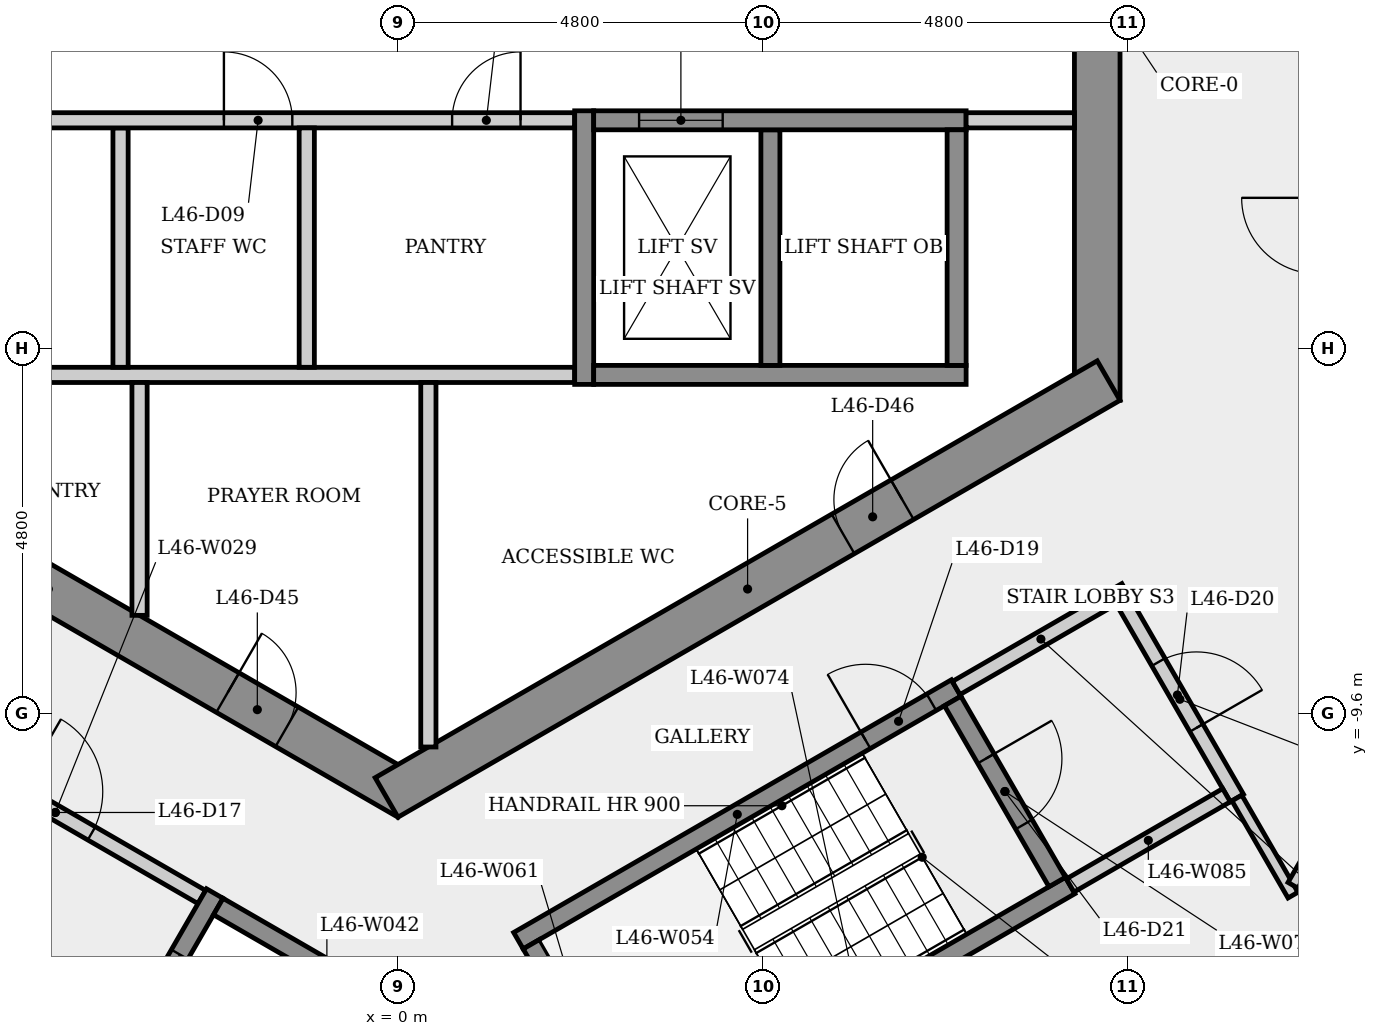
"""IFC4 building model, lengths in metres.
Left out: names, types, materials, properties, quantities, classifications, styles, units other than length and angle.
Written with IfcOpenShell. Run it as: python <this file> out.ifc"""

import sys

from ifc_helpers import new_model, si_unit, direction, frame, frame_2d, origin, place, context, subcontext, project, spatial, rectangle, extrude, element, fill, save


model = new_model("IFC4")
c1 = context("Model", 3, precision=1e-05, world=origin(), true_north=direction((0.0, 1.0)))
c2 = subcontext(c1, "Body", "Model", "MODEL_VIEW")
j1 = project(units=[si_unit("LENGTHUNIT", "METRE"), si_unit("PLANEANGLEUNIT", "RADIAN")], contexts=[c1])
p1 = place(None, origin())
s1 = spatial("IfcSite", under=j1, at=p1, CompositionType="ELEMENT")
p2 = place(p1, origin())
s2 = spatial("IfcBuilding", under=s1, at=p2, CompositionType="ELEMENT")
p3 = place(p2, frame((0.0, 0.0, 173.1)))
s3 = spatial("IfcBuildingStorey", under=s2, at=p3, CompositionType="ELEMENT", Elevation=173.1)
p4 = place(p3, frame((9.2, -5.485, 0.0), z_axis=(0.0, 0.0, 1.0), x_axis=(0.0, 1.0, 0.0)))
e1 = element("IfcWall", 1, at=p4, inside=s3, PredefinedType="SHEAR", context=c2, shape_type="SweptSolid", body=[
    extrude(rectangle(XDim=10.97, YDim=0.6, at=frame_2d((5.485, 0.0))), origin(), (0.0, 0.0, 1.0), 3.4),
])
p5 = place(p4, frame((4.685, 0.0, 0.0)))
e2 = element("IfcOpeningElement", 2, at=p5, cuts=e1, PredefinedType="OPENING", context=c2, shape_type="SweptSolid", body=[
    extrude(rectangle(XDim=1.6, YDim=2.1, at=frame_2d((0.8, 1.05))), frame((0.0, 0.31, 0.0), z_axis=(0.0, -1.0, 0.0), x_axis=(1.0, 0.0, 0.0)), (0.0, 0.0, 1.0), 0.62),
])
p6 = place(p3, frame((-9.35, -5.225, 0.0), z_axis=(0.0, 0.0, 1.0), x_axis=(0.866023993627, -0.500002442456, 0.0)))
e3 = element("IfcWall", 3, at=p6, inside=s3, PredefinedType="SHEAR", context=c2, shape_type="SweptSolid", body=[
    extrude(rectangle(XDim=10.97, YDim=0.6, at=frame_2d((5.485, 0.0))), origin(), (0.0, 0.0, 1.0), 3.4),
])
p7 = place(p6, frame((3.084, 0.0, 0.0)))
e4 = element("IfcOpeningElement", 4, at=p7, cuts=e3, PredefinedType="OPENING", context=c2, shape_type="SweptSolid", body=[
    extrude(rectangle(XDim=0.9, YDim=2.1, at=frame_2d((0.45, 1.05))), frame((0.0, 0.31, 0.0), z_axis=(0.0, -1.0, 0.0), x_axis=(1.0, 0.0, 0.0)), (0.0, 0.0, 1.0), 0.62),
])
p8 = place(p6, frame((8.21, 0.0, 0.0)))
e5 = element("IfcOpeningElement", 5, at=p8, cuts=e3, PredefinedType="OPENING", context=c2, shape_type="SweptSolid", body=[
    extrude(rectangle(XDim=0.9, YDim=2.1, at=frame_2d((0.45, 1.05))), frame((0.0, 0.31, 0.0), z_axis=(0.0, -1.0, 0.0), x_axis=(1.0, 0.0, 0.0)), (0.0, 0.0, 1.0), 0.62),
])
p9 = place(p3, frame((-0.15, -10.71, 0.0), z_axis=(0.0, 0.0, 1.0), x_axis=(0.866023993627, 0.500002442456, 0.0)))
e6 = element("IfcWall", 6, at=p9, inside=s3, PredefinedType="SHEAR", context=c2, shape_type="SweptSolid", body=[
    extrude(rectangle(XDim=10.97, YDim=0.6, at=frame_2d((5.485, 0.0))), origin(), (0.0, 0.0, 1.0), 3.4),
])
p10 = place(p9, frame((6.935, 0.0, 0.0)))
e7 = element("IfcOpeningElement", 7, at=p10, cuts=e6, PredefinedType="OPENING", context=c2, shape_type="SweptSolid", body=[
    extrude(rectangle(XDim=0.9, YDim=2.1, at=frame_2d((0.45, 1.05))), frame((0.0, 0.31, 0.0), z_axis=(0.0, -1.0, 0.0), x_axis=(1.0, 0.0, 0.0)), (0.0, 0.0, 1.0), 0.62),
])
p11 = place(p3, frame((-8.88, -5.15, 0.0), z_axis=(0.0, 0.0, 1.0), x_axis=(1.0, 0.0, 0.0)))
e8 = element("IfcWall", 8, at=p11, inside=s3, PredefinedType="PARTITIONING", context=c2, shape_type="SweptSolid", body=[
    extrude(rectangle(XDim=11.205, YDim=0.2, at=frame_2d((5.603, 0.0))), origin(), (0.0, 0.0, 1.0), 3.05),
])
p12 = place(p3, frame((-6.435, -9.795, 0.0), z_axis=(0.0, 0.0, 1.0), x_axis=(0.866012907634, -0.500021643343, 0.0)))
e9 = element("IfcWall", 9, at=p12, inside=s3, PredefinedType="PARTITIONING", context=c2, shape_type="SweptSolid", body=[
    extrude(rectangle(XDim=4.45, YDim=0.2, at=frame_2d((2.225, 0.0))), origin(), (0.0, 0.0, 1.0), 3.05),
])
p13 = place(p12, frame((1.675, 0.0, 0.0)))
e10 = element("IfcOpeningElement", 10, at=p13, cuts=e9, PredefinedType="OPENING", context=c2, shape_type="SweptSolid", body=[
    extrude(rectangle(XDim=1.1, YDim=2.1, at=frame_2d((0.55, 1.05))), frame((0.0, 0.11, 0.0), z_axis=(0.0, -1.0, 0.0), x_axis=(1.0, 0.0, 0.0)), (0.0, 0.0, 1.0), 0.22),
])
p14 = place(p3, frame((-3.65, -1.9, 0.0), z_axis=(0.0, 0.0, 1.0), x_axis=(0.0, -1.0, 0.0)))
e11 = element("IfcWall", 11, at=p14, inside=s3, PredefinedType="PARTITIONING", context=c2, shape_type="SweptSolid", body=[
    extrude(rectangle(XDim=3.15, YDim=0.2, at=frame_2d((1.575, 0.0))), origin(), (0.0, 0.0, 1.0), 3.05),
])
p15 = place(p3, frame((-8.9, -1.8, 0.0), z_axis=(0.0, 0.0, 1.0), x_axis=(1.0, 0.0, 0.0)))
e12 = element("IfcWall", 12, at=p15, inside=s3, PredefinedType="PARTITIONING", context=c2, shape_type="SweptSolid", body=[
    extrude(rectangle(XDim=11.225, YDim=0.2, at=frame_2d((5.613, 0.0))), origin(), (0.0, 0.0, 1.0), 3.05),
])
p16 = place(p15, frame((2.16, 0.0, 0.0)))
e13 = element("IfcOpeningElement", 13, at=p16, cuts=e12, PredefinedType="OPENING", context=c2, shape_type="SweptSolid", body=[
    extrude(rectangle(XDim=0.9, YDim=2.1, at=frame_2d((0.45, 1.05))), frame((0.0, 0.11, 0.0), z_axis=(0.0, -1.0, 0.0), x_axis=(1.0, 0.0, 0.0)), (0.0, 0.0, 1.0), 0.22),
])
p17 = place(p15, frame((6.61, 0.0, 0.0)))
e14 = element("IfcOpeningElement", 14, at=p17, cuts=e12, PredefinedType="OPENING", context=c2, shape_type="SweptSolid", body=[
    extrude(rectangle(XDim=0.9, YDim=2.1, at=frame_2d((0.45, 1.05))), frame((0.0, 0.11, 0.0), z_axis=(0.0, -1.0, 0.0), x_axis=(1.0, 0.0, 0.0)), (0.0, 0.0, 1.0), 0.22),
])
p18 = place(p15, frame((9.613, 0.0, 0.0)))
e15 = element("IfcOpeningElement", 15, at=p18, cuts=e12, PredefinedType="OPENING", context=c2, shape_type="SweptSolid", body=[
    extrude(rectangle(XDim=0.9, YDim=2.1, at=frame_2d((0.45, 1.05))), frame((0.0, 0.11, 0.0), z_axis=(0.0, -1.0, 0.0), x_axis=(1.0, 0.0, 0.0)), (0.0, 0.0, 1.0), 0.22),
])
p19 = place(p3, frame((-3.4, -5.25, 0.0), z_axis=(0.0, 0.0, 1.0), x_axis=(0.0, -1.0, 0.0)))
e16 = element("IfcWall", 16, at=p19, inside=s3, PredefinedType="PARTITIONING", context=c2, shape_type="SweptSolid", body=[
    extrude(rectangle(XDim=3.064, YDim=0.2, at=frame_2d((1.532, 0.0))), origin(), (0.0, 0.0, 1.0), 3.05),
])
p20 = place(p3, frame((-2.41, -11.974, 0.0), z_axis=(0.0, 0.0, 1.0), x_axis=(-0.500001826776, -0.866024349092, 0.0)))
e17 = element("IfcWall", 17, at=p20, inside=s3, PredefinedType="SHEAR", context=c2, shape_type="SweptSolid", body=[
    extrude(rectangle(XDim=2.95, YDim=0.25, at=frame_2d((1.475, 0.0))), origin(), (0.0, 0.0, 1.0), 3.05),
])
p21 = place(p20, frame((0.925, 0.0, 0.0)))
e18 = element("IfcOpeningElement", 18, at=p21, cuts=e17, PredefinedType="OPENING", context=c2, shape_type="SweptSolid", body=[
    extrude(rectangle(XDim=1.1, YDim=2.1, at=frame_2d((0.55, 1.05))), frame((0.0, 0.135, 0.0), z_axis=(0.0, -1.0, 0.0), x_axis=(1.0, 0.0, 0.0)), (0.0, 0.0, 1.0), 0.27),
])
p22 = place(p3, frame((-2.364, -12.145, 0.0), z_axis=(0.0, 0.0, 1.0), x_axis=(0.866040211805, -0.499974350878, 0.0)))
e19 = element("IfcWall", 19, at=p22, inside=s3, PredefinedType="SHEAR", context=c2, shape_type="SweptSolid", body=[
    extrude(rectangle(XDim=3.3, YDim=0.25, at=frame_2d((1.65, 0.0))), origin(), (0.0, 0.0, 1.0), 3.05),
])
p23 = place(p3, frame((-1.2, -1.9, 0.0), z_axis=(0.0, 0.0, 1.0), x_axis=(0.0, -1.0, 0.0)))
e20 = element("IfcWall", 20, at=p23, inside=s3, PredefinedType="PARTITIONING", context=c2, shape_type="SweptSolid", body=[
    extrude(rectangle(XDim=3.15, YDim=0.2, at=frame_2d((1.575, 0.0))), origin(), (0.0, 0.0, 1.0), 3.05),
])
p24 = place(p3, frame((0.4, -5.25, 0.0), z_axis=(0.0, 0.0, 1.0), x_axis=(0.0, -1.0, 0.0)))
e21 = element("IfcWall", 21, at=p24, inside=s3, PredefinedType="PARTITIONING", context=c2, shape_type="SweptSolid", body=[
    extrude(rectangle(XDim=4.796, YDim=0.2, at=frame_2d((2.398, 0.0))), origin(), (0.0, 0.0, 1.0), 3.05),
])
p25 = place(p3, frame((1.585, -12.595, 0.0), z_axis=(0.0, 0.0, 1.0), x_axis=(0.866036417653, 0.499980922934, 0.0)))
e22 = element("IfcWall", 22, at=p25, inside=s3, PredefinedType="SHEAR", context=c2, shape_type="SweptSolid", body=[
    extrude(rectangle(XDim=6.65, YDim=0.25, at=frame_2d((3.325, 0.0))), origin(), (0.0, 0.0, 1.0), 3.05),
])
p26 = place(p25, frame((5.275, 0.0, 0.0)))
e23 = element("IfcOpeningElement", 23, at=p26, cuts=e22, PredefinedType="OPENING", context=c2, shape_type="SweptSolid", body=[
    extrude(rectangle(XDim=1.0, YDim=2.1, at=frame_2d((0.5, 1.05))), frame((0.0, 0.135, 0.0), z_axis=(0.0, -1.0, 0.0), x_axis=(1.0, 0.0, 0.0)), (0.0, 0.0, 1.0), 0.27),
])
p27 = place(p3, frame((2.45, -5.275, 0.0), z_axis=(0.0, 0.0, 1.0), x_axis=(0.0, 1.0, 0.0)))
e24 = element("IfcWall", 24, at=p27, inside=s3, PredefinedType="SHEAR", context=c2, shape_type="SweptSolid", body=[
    extrude(rectangle(XDim=3.6, YDim=0.25, at=frame_2d((1.8, 0.0))), origin(), (0.0, 0.0, 1.0), 3.05),
])
p28 = place(p3, frame((3.256, -15.239, 0.0), z_axis=(0.0, 0.0, 1.0), x_axis=(-0.50002537861, 0.866010750942, 0.0)))
e25 = element("IfcWall", 25, at=p28, inside=s3, PredefinedType="SHEAR", context=c2, shape_type="SweptSolid", body=[
    extrude(rectangle(XDim=3.0, YDim=0.25, at=frame_2d((1.5, 0.0))), origin(), (0.0, 0.0, 1.0), 3.05),
])
p29 = place(p3, frame((2.575, -5.15, 0.0), z_axis=(0.0, 0.0, 1.0), x_axis=(1.0, 0.0, 0.0)))
e26 = element("IfcWall", 26, at=p29, inside=s3, PredefinedType="SHEAR", context=c2, shape_type="SweptSolid", body=[
    extrude(rectangle(XDim=4.9, YDim=0.25, at=frame_2d((2.45, 0.0))), origin(), (0.0, 0.0, 1.0), 3.05),
])
p30 = place(p3, frame((4.9, -1.925, 0.0), z_axis=(0.0, 0.0, 1.0), x_axis=(0.0, -1.0, 0.0)))
e27 = element("IfcWall", 27, at=p30, inside=s3, PredefinedType="SHEAR", context=c2, shape_type="SweptSolid", body=[
    extrude(rectangle(XDim=3.1, YDim=0.25, at=frame_2d((1.55, 0.0))), origin(), (0.0, 0.0, 1.0), 3.4),
])
p31 = place(p3, frame((2.575, -1.8, 0.0), z_axis=(0.0, 0.0, 1.0), x_axis=(1.0, 0.0, 0.0)))
e28 = element("IfcWall", 28, at=p31, inside=s3, PredefinedType="SHEAR", context=c2, shape_type="SweptSolid", body=[
    extrude(rectangle(XDim=4.9, YDim=0.25, at=frame_2d((2.45, 0.0))), origin(), (0.0, 0.0, 1.0), 3.05),
])
p32 = place(p31, frame((0.597, 0.0, 0.0)))
e29 = element("IfcOpeningElement", 29, at=p32, cuts=e28, PredefinedType="OPENING", context=c2, shape_type="SweptSolid", body=[
    extrude(rectangle(XDim=1.1, YDim=2.1, at=frame_2d((0.55, 1.05))), frame((0.0, 0.135, 0.0), z_axis=(0.0, -1.0, 0.0), x_axis=(1.0, 0.0, 0.0)), (0.0, 0.0, 1.0), 0.27),
])
p33 = place(p3, frame((3.301, -15.068, 0.0), z_axis=(0.0, 0.0, 1.0), x_axis=(0.866035036182, 0.499983315828, 0.0)))
e30 = element("IfcWall", 30, at=p33, inside=s3, PredefinedType="SHEAR", context=c2, shape_type="SweptSolid", body=[
    extrude(rectangle(XDim=6.4, YDim=0.25, at=frame_2d((3.2, 0.0))), origin(), (0.0, 0.0, 1.0), 3.05),
])
p34 = place(p3, frame((7.298, -9.441, 0.0), z_axis=(0.0, 0.0, 1.0), x_axis=(0.500034990121, -0.866005201286, 0.0)))
e31 = element("IfcWall", 31, at=p34, inside=s3, PredefinedType="SHEAR", context=c2, shape_type="SweptSolid", body=[
    extrude(rectangle(XDim=2.75, YDim=0.25, at=frame_2d((1.375, 0.0))), origin(), (0.0, 0.0, 1.0), 3.05),
])
p35 = place(p34, frame((0.875, 0.0, 0.0)))
e32 = element("IfcOpeningElement", 32, at=p35, cuts=e31, PredefinedType="OPENING", context=c2, shape_type="SweptSolid", body=[
    extrude(rectangle(XDim=1.0, YDim=2.1, at=frame_2d((0.5, 1.05))), frame((0.0, 0.135, 0.0), z_axis=(0.0, -1.0, 0.0), x_axis=(1.0, 0.0, 0.0)), (0.0, 0.0, 1.0), 0.27),
])
p36 = place(p3, frame((7.344, -9.27, 0.0), z_axis=(0.0, 0.0, 1.0), x_axis=(0.866005588531, 0.500034319456, 0.0)))
e33 = element("IfcWall", 33, at=p36, inside=s3, PredefinedType="PARTITIONING", context=c2, shape_type="SweptSolid", body=[
    extrude(rectangle(XDim=2.575, YDim=0.2, at=frame_2d((1.288, 0.0))), origin(), (0.0, 0.0, 1.0), 3.05),
])
p37 = place(p3, frame((7.35, -1.925, 0.0), z_axis=(0.0, 0.0, 1.0), x_axis=(0.0, -1.0, 0.0)))
e34 = element("IfcWall", 34, at=p37, inside=s3, PredefinedType="SHEAR", context=c2, shape_type="SweptSolid", body=[
    extrude(rectangle(XDim=3.1, YDim=0.25, at=frame_2d((1.55, 0.0))), origin(), (0.0, 0.0, 1.0), 3.4),
])
p38 = place(p3, frame((8.9, -1.8, 0.0), z_axis=(0.0, 0.0, 1.0), x_axis=(-1.0, 0.0, 0.0)))
e35 = element("IfcWall", 35, at=p38, inside=s3, PredefinedType="PARTITIONING", context=c2, shape_type="SweptSolid", body=[
    extrude(rectangle(XDim=1.425, YDim=0.2, at=frame_2d((0.712, 0.0))), origin(), (0.0, 0.0, 1.0), 3.05),
])
p39 = place(p3, frame((9.537, -8.119, 0.0), z_axis=(0.0, 0.0, 1.0), x_axis=(0.499990139034, -0.866031096941, 0.0)))
e36 = element("IfcWall", 36, at=p39, inside=s3, PredefinedType="PARTITIONING", context=c2, shape_type="SweptSolid", body=[
    extrude(rectangle(XDim=3.0, YDim=0.2, at=frame_2d((1.5, 0.0))), origin(), (0.0, 0.0, 1.0), 3.05),
])
p40 = place(p39, frame((0.935, 0.0, 0.0)))
e37 = element("IfcOpeningElement", 37, at=p40, cuts=e36, PredefinedType="OPENING", context=c2, shape_type="SweptSolid", body=[
    extrude(rectangle(XDim=1.0, YDim=2.1, at=frame_2d((0.5, 1.05))), frame((0.0, 0.11, 0.0), z_axis=(0.0, -1.0, 0.0), x_axis=(1.0, 0.0, 0.0)), (0.0, 0.0, 1.0), 0.22),
])
p41 = place(p3, frame((10.901, -10.681, 0.0), z_axis=(0.0, 0.0, 1.0), x_axis=(-0.866007538022, -0.500030943131, 0.0)))
e38 = element("IfcWall", 38, at=p41, inside=s3, PredefinedType="PARTITIONING", context=c2, shape_type="SweptSolid", body=[
    extrude(rectangle(XDim=2.375, YDim=0.2, at=frame_2d((1.188, 0.0))), origin(), (0.0, 0.0, 1.0), 3.05),
])
p42 = place(p3, frame((11.775, -11.995, 0.0), z_axis=(0.0, 0.0, 1.0), x_axis=(-0.499875190247, 0.866097450739, 0.0)))
e39 = element("IfcWall", 39, at=p42, inside=s3, PredefinedType="PARTITIONING", context=c2, shape_type="SweptSolid", body=[
    extrude(rectangle(XDim=1.476, YDim=0.15, at=frame_2d((0.738, 0.0))), origin(), (0.0, 0.0, 1.0), 3.05),
])
p43 = place(p3, frame((15.693, -5.079, 0.0), z_axis=(0.0, 0.0, 1.0), x_axis=(-0.500009219579, -0.866020080793, 0.0)))
e40 = element("IfcWall", 40, at=p43, inside=s3, PredefinedType="PARTITIONING", context=c2, shape_type="SweptSolid", body=[
    extrude(rectangle(XDim=7.836, YDim=0.15, at=frame_2d((3.918, 0.0))), origin(), (0.0, 0.0, 1.0), 3.05),
])
p44 = place(p43, frame((3.418, 0.0, 0.0)))
e41 = element("IfcOpeningElement", 41, at=p44, cuts=e40, PredefinedType="OPENING", context=c2, shape_type="SweptSolid", body=[
    extrude(rectangle(XDim=1.0, YDim=2.1, at=frame_2d((0.5, 1.05))), frame((0.0, 0.085, 0.0), z_axis=(0.0, -1.0, 0.0), x_axis=(1.0, 0.0, 0.0)), (0.0, 0.0, 1.0), 0.17),
])
p45 = place(p32, origin())
e42 = element("IfcDoor", 42, at=p45, inside=s3, OperationType="SLIDING_TO_LEFT", PredefinedType="DOOR", context=c2, shape_type="SweptSolid", body=[
    extrude(rectangle(XDim=1.1, YDim=2.1, at=frame_2d((0.55, 1.05))), frame((0.0, 0.025, 0.0), z_axis=(0.0, -1.0, 0.0), x_axis=(1.0, 0.0, 0.0)), (0.0, 0.0, 1.0), 0.05),
])
fill(e29, e42)
p46 = place(p17, origin())
e43 = element("IfcDoor", 43, at=p46, inside=s3, OperationType="SINGLE_SWING_LEFT", PredefinedType="DOOR", context=c2, shape_type="SweptSolid", body=[
    extrude(rectangle(XDim=0.9, YDim=2.1, at=frame_2d((0.45, 1.05))), frame((0.0, 0.025, 0.0), z_axis=(0.0, -1.0, 0.0), x_axis=(1.0, 0.0, 0.0)), (0.0, 0.0, 1.0), 0.05),
])
fill(e14, e43)
p47 = place(p18, origin())
e44 = element("IfcDoor", 44, at=p47, inside=s3, OperationType="SINGLE_SWING_RIGHT", PredefinedType="DOOR", context=c2, shape_type="SweptSolid", body=[
    extrude(rectangle(XDim=0.9, YDim=2.1, at=frame_2d((0.45, 1.05))), frame((0.0, 0.025, 0.0), z_axis=(0.0, -1.0, 0.0), x_axis=(1.0, 0.0, 0.0)), (0.0, 0.0, 1.0), 0.05),
])
fill(e15, e44)
p48 = place(p13, origin())
e45 = element("IfcDoor", 45, at=p48, inside=s3, OperationType="SINGLE_SWING_LEFT", PredefinedType="DOOR", context=c2, shape_type="SweptSolid", body=[
    extrude(rectangle(XDim=1.1, YDim=2.1, at=frame_2d((0.55, 1.05))), frame((0.0, 0.025, 0.0), z_axis=(0.0, -1.0, 0.0), x_axis=(1.0, 0.0, 0.0)), (0.0, 0.0, 1.0), 0.05),
])
fill(e10, e45)
p49 = place(p21, origin())
e46 = element("IfcDoor", 46, at=p49, inside=s3, OperationType="SLIDING_TO_LEFT", PredefinedType="DOOR", context=c2, shape_type="SweptSolid", body=[
    extrude(rectangle(XDim=1.1, YDim=2.1, at=frame_2d((0.55, 1.05))), frame((0.0, 0.025, 0.0), z_axis=(0.0, -1.0, 0.0), x_axis=(1.0, 0.0, 0.0)), (0.0, 0.0, 1.0), 0.05),
])
fill(e18, e46)
p50 = place(p26, origin())
e47 = element("IfcDoor", 47, at=p50, inside=s3, OperationType="SINGLE_SWING_LEFT", PredefinedType="DOOR", context=c2, shape_type="SweptSolid", body=[
    extrude(rectangle(XDim=1.0, YDim=2.1, at=frame_2d((0.5, 1.05))), frame((0.0, 0.025, 0.0), z_axis=(0.0, -1.0, 0.0), x_axis=(1.0, 0.0, 0.0)), (0.0, 0.0, 1.0), 0.05),
])
fill(e23, e47)
p51 = place(p40, origin())
e48 = element("IfcDoor", 48, at=p51, inside=s3, OperationType="SINGLE_SWING_RIGHT", PredefinedType="DOOR", context=c2, shape_type="SweptSolid", body=[
    extrude(rectangle(XDim=1.0, YDim=2.1, at=frame_2d((0.5, 1.05))), frame((0.0, 0.025, 0.0), z_axis=(0.0, -1.0, 0.0), x_axis=(1.0, 0.0, 0.0)), (0.0, 0.0, 1.0), 0.05),
])
fill(e37, e48)
p52 = place(p35, origin())
e49 = element("IfcDoor", 49, at=p52, inside=s3, OperationType="SINGLE_SWING_LEFT", PredefinedType="DOOR", context=c2, shape_type="SweptSolid", body=[
    extrude(rectangle(XDim=1.0, YDim=2.1, at=frame_2d((0.5, 1.05))), frame((0.0, 0.025, 0.0), z_axis=(0.0, -1.0, 0.0), x_axis=(1.0, 0.0, 0.0)), (0.0, 0.0, 1.0), 0.05),
])
fill(e32, e49)
p53 = place(p8, origin())
e50 = element("IfcDoor", 50, at=p53, inside=s3, OperationType="SINGLE_SWING_LEFT", PredefinedType="DOOR", context=c2, shape_type="SweptSolid", body=[
    extrude(rectangle(XDim=0.9, YDim=2.1, at=frame_2d((0.45, 1.05))), frame((0.0, 0.025, 0.0), z_axis=(0.0, -1.0, 0.0), x_axis=(1.0, 0.0, 0.0)), (0.0, 0.0, 1.0), 0.05),
])
fill(e5, e50)
p54 = place(p10, origin())
e51 = element("IfcDoor", 51, at=p54, inside=s3, OperationType="SINGLE_SWING_RIGHT", PredefinedType="DOOR", context=c2, shape_type="SweptSolid", body=[
    extrude(rectangle(XDim=0.9, YDim=2.1, at=frame_2d((0.45, 1.05))), frame((0.0, 0.025, 0.0), z_axis=(0.0, -1.0, 0.0), x_axis=(1.0, 0.0, 0.0)), (0.0, 0.0, 1.0), 0.05),
])
fill(e7, e51)
save(model, sys.argv[1])
